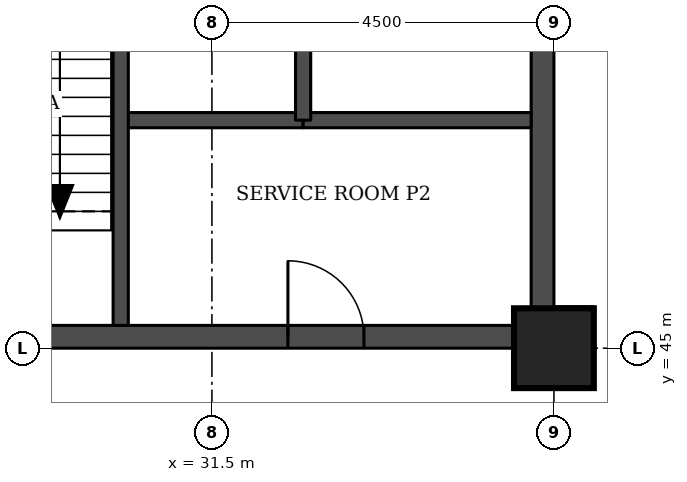
"""IFC4 building model, lengths in metres.
Left out: names, types, materials, properties, quantities, classifications, styles, units other than length and angle.
Written with IfcOpenShell. Run it as: python <this file> out.ifc"""

import sys

from ifc_helpers import new_model, si_unit, direction, frame, frame_2d, origin, origin_2d, place, context, subcontext, project, spatial, rectangle, extrude, element, fill, save


model = new_model("IFC4")
c1 = context("Model", 3, precision=1e-05, world=origin(), true_north=direction((0.0, 1.0)))
c2 = subcontext(c1, "Body", "Model", "MODEL_VIEW")
j1 = project(units=[si_unit("LENGTHUNIT", "METRE"), si_unit("PLANEANGLEUNIT", "RADIAN")], contexts=[c1])
p1 = place(None, origin())
s1 = spatial("IfcSite", under=j1, at=p1, CompositionType="ELEMENT")
p2 = place(p1, origin())
s2 = spatial("IfcBuilding", under=s1, at=p2, CompositionType="ELEMENT")
p3 = place(p2, frame((0.0, 0.0, 112.2)))
s3 = spatial("IfcBuildingStorey", under=s2, at=p3, CompositionType="ELEMENT", Elevation=112.2)
p4 = place(p3, frame((36.0, 45.0, 0.0), z_axis=(0.0, 0.0, 1.0), x_axis=(1.0, 0.0, 0.0)))
e1 = element("IfcColumn", 1, at=p4, inside=s3, PredefinedType="COLUMN", context=c2, shape_type="SweptSolid", body=[
    extrude(rectangle(XDim=1.05, YDim=1.05, at=origin_2d()), origin(), (0.0, 0.0, 1.0), 3.7),
])
p5 = place(p3, frame((27.3, 45.15, 0.0), z_axis=(0.0, 0.0, 1.0), x_axis=(1.0, 0.0, 0.0)))
e2 = element("IfcWall", 2, at=p5, inside=s3, PredefinedType="SHEAR", context=c2, shape_type="SweptSolid", body=[
    extrude(rectangle(XDim=8.4, YDim=0.3, at=frame_2d((4.2, 0.0))), origin(), (0.0, 0.0, 1.0), 3.7),
])
p6 = place(p5, frame((5.2, 0.0, 0.0)))
e3 = element("IfcOpeningElement", 3, at=p6, cuts=e2, PredefinedType="OPENING", context=c2, shape_type="SweptSolid", body=[
    extrude(rectangle(XDim=1.0, YDim=2.1, at=frame_2d((0.5, 1.05))), frame((0.0, 0.16, 0.0), z_axis=(0.0, -1.0, 0.0), x_axis=(1.0, 0.0, 0.0)), (0.0, 0.0, 1.0), 0.32),
])
p7 = place(p3, frame((35.85, 45.0, 0.0), z_axis=(0.0, 0.0, 1.0), x_axis=(0.0, 1.0, 0.0)))
e4 = element("IfcWall", 4, at=p7, inside=s3, PredefinedType="SHEAR", context=c2, shape_type="SweptSolid", body=[
    extrude(rectangle(XDim=9.0, YDim=0.3, at=frame_2d((4.5, 0.0))), origin(), (0.0, 0.0, 1.0), 3.7),
])
p8 = place(p3, frame((30.3, 48.0, 0.0), z_axis=(0.0, 0.0, 1.0), x_axis=(1.0, 0.0, 0.0)))
e5 = element("IfcWall", 5, at=p8, inside=s3, PredefinedType="SOLIDWALL", context=c2, shape_type="SweptSolid", body=[
    extrude(rectangle(XDim=2.4, YDim=0.2, at=frame_2d((1.2, 0.0))), origin(), (0.0, 0.0, 1.0), 3.55),
])
p9 = place(p3, frame((32.7, 48.0, 0.0), z_axis=(0.0, 0.0, 1.0), x_axis=(1.0, 0.0, 0.0)))
e6 = element("IfcWall", 6, at=p9, inside=s3, PredefinedType="SOLIDWALL", context=c2, shape_type="SweptSolid", body=[
    extrude(rectangle(XDim=3.0, YDim=0.2, at=frame_2d((1.5, 0.0))), origin(), (0.0, 0.0, 1.0), 3.55),
])
for number, where, z_axis, x_axis in (
    (7, (30.3, 45.3, 0.0), (0.0, 0.0, 1.0), (0.0, 1.0, 0.0)),
    (8, (32.7, 48.0, 0.0), (0.0, 0.0, 1.0), (0.0, 1.0, 0.0)),
):
    element("IfcWall", number, at=place(p3, frame(where, z_axis=z_axis, x_axis=x_axis)), inside=s3, PredefinedType="SOLIDWALL", context=c2, shape_type="SweptSolid", body=[
        extrude(rectangle(XDim=5.7, YDim=0.2, at=frame_2d((2.85, 0.0))), origin(), (0.0, 0.0, 1.0), 3.55),
    ])
p10 = place(p6, origin())
e9 = element("IfcDoor", 9, at=p10, inside=s3, OperationType="SINGLE_SWING_LEFT", PredefinedType="DOOR", context=c2, shape_type="SweptSolid", body=[
    extrude(rectangle(XDim=1.0, YDim=2.1, at=frame_2d((0.5, 1.05))), frame((0.0, 0.025, 0.0), z_axis=(0.0, -1.0, 0.0), x_axis=(1.0, 0.0, 0.0)), (0.0, 0.0, 1.0), 0.05),
])
fill(e3, e9)
save(model, sys.argv[1])
